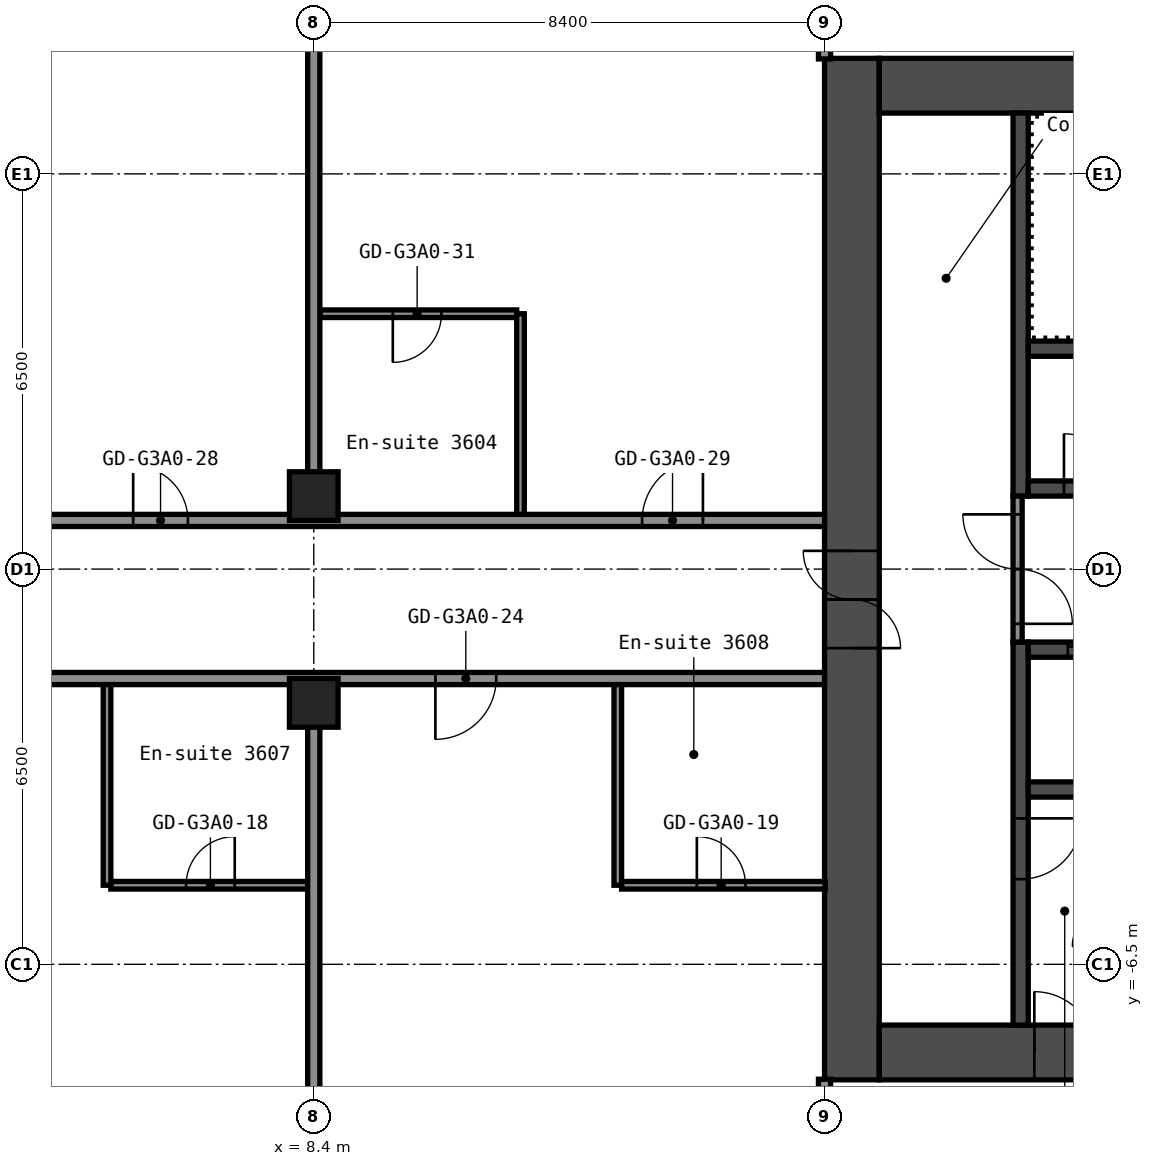
"""IFC4 building model, lengths in metres.
Left out: names, types, materials, properties, quantities, classifications, styles, units other than length and angle.
Written with IfcOpenShell. Run it as: python <this file> out.ifc"""

import sys

from ifc_helpers import new_model, si_unit, direction, frame, frame_2d, origin, origin_2d, place, context, subcontext, project, spatial, rectangle, hollow_rectangle, extrude, element, fill, save


model = new_model("IFC4")
c1 = context("Model", 3, precision=1e-05, world=origin(), true_north=direction((0.0, 1.0)))
c2 = subcontext(c1, "Body", "Model", "MODEL_VIEW")
j1 = project(units=[si_unit("LENGTHUNIT", "METRE"), si_unit("PLANEANGLEUNIT", "RADIAN")], contexts=[c1])
p1 = place(None, origin())
s1 = spatial("IfcSite", under=j1, at=p1, CompositionType="ELEMENT")
p2 = place(p1, origin())
s2 = spatial("IfcBuilding", under=s1, at=p2, CompositionType="ELEMENT")
p3 = place(p2, frame((0.0, 0.0, 131.0)))
s3 = spatial("IfcBuildingStorey", under=s2, at=p3, CompositionType="ELEMENT", Elevation=131.0)
for number, where, z_axis, x_axis in (
    (1, (8.4, -2.2, 0.0), (0.0, 0.0, 1.0), (1.0, 0.0, 0.0)),
    (2, (8.4, 1.2, 0.0), (0.0, 0.0, 1.0), (1.0, 0.0, 0.0)),
):
    element("IfcColumn", number, at=place(p3, frame(where, z_axis=z_axis, x_axis=x_axis)), inside=s3, PredefinedType="COLUMN", context=c2, shape_type="SweptSolid", body=[
        extrude(hollow_rectangle(XDim=0.8, YDim=0.8, WallThickness=0.032, at=origin_2d()), origin(), (0.0, 0.0, 1.0), 2.75),
    ])
p4 = place(p3, frame((17.25, -8.4, 0.0), z_axis=(0.0, 0.0, 1.0), x_axis=(0.0, 1.0, 0.0)))
e3 = element("IfcWall", 3, at=p4, inside=s3, PredefinedType="SHEAR", context=c2, shape_type="SweptSolid", body=[
    extrude(rectangle(XDim=16.8, YDim=0.9, at=frame_2d((8.4, 0.0))), origin(), (0.0, 0.0, 1.0), 2.75),
])
p5 = place(p4, frame((7.1, 0.0, 0.0)))
e4 = element("IfcOpeningElement", 4, at=p5, cuts=e3, PredefinedType="OPENING", context=c2, shape_type="SweptSolid", body=[
    extrude(rectangle(XDim=1.6, YDim=2.1, at=frame_2d((0.8, 1.05))), frame((0.0, 0.46, 0.0), z_axis=(0.0, -1.0, 0.0), x_axis=(1.0, 0.0, 0.0)), (0.0, 0.0, 1.0), 0.92),
])
p6 = place(p3, frame((17.7, 7.95, 0.0), z_axis=(0.0, 0.0, 1.0), x_axis=(1.0, 0.0, 0.0)))
e5 = element("IfcWall", 5, at=p6, inside=s3, PredefinedType="SHEAR", context=c2, shape_type="SweptSolid", body=[
    extrude(rectangle(XDim=15.0, YDim=0.9, at=frame_2d((7.5, 0.0))), origin(), (0.0, 0.0, 1.0), 2.75),
])
p7 = place(p6, frame((10.4, 0.0, 0.0)))
e6 = element("IfcOpeningElement", 6, at=p7, cuts=e5, PredefinedType="OPENING", context=c2, shape_type="SweptSolid", body=[
    extrude(rectangle(XDim=1.2, YDim=2.1, at=frame_2d((0.6, 1.05))), frame((0.0, 0.46, 0.0), z_axis=(0.0, -1.0, 0.0), x_axis=(1.0, 0.0, 0.0)), (0.0, 0.0, 1.0), 0.92),
])
p8 = place(p6, frame((13.35, 0.0, 0.0)))
e7 = element("IfcOpeningElement", 7, at=p8, cuts=e5, PredefinedType="OPENING", context=c2, shape_type="SweptSolid", body=[
    extrude(rectangle(XDim=0.9, YDim=2.1, at=frame_2d((0.45, 1.05))), frame((0.0, 0.46, 0.0), z_axis=(0.0, -1.0, 0.0), x_axis=(1.0, 0.0, 0.0)), (0.0, 0.0, 1.0), 0.92),
])
p9 = place(p3, frame((17.7, -7.95, 0.0), z_axis=(0.0, 0.0, 1.0), x_axis=(1.0, 0.0, 0.0)))
e8 = element("IfcWall", 8, at=p9, inside=s3, PredefinedType="SHEAR", context=c2, shape_type="SweptSolid", body=[
    extrude(rectangle(XDim=15.0, YDim=0.9, at=frame_2d((7.5, 0.0))), origin(), (0.0, 0.0, 1.0), 2.75),
])
p10 = place(p9, frame((2.55, 0.0, 0.0)))
e9 = element("IfcOpeningElement", 9, at=p10, cuts=e8, PredefinedType="OPENING", context=c2, shape_type="SweptSolid", body=[
    extrude(rectangle(XDim=1.0, YDim=2.1, at=frame_2d((0.5, 1.05))), frame((0.0, 0.46, 0.0), z_axis=(0.0, -1.0, 0.0), x_axis=(1.0, 0.0, 0.0)), (0.0, 0.0, 1.0), 0.92),
])
p11 = place(p3, frame((20.025, 1.2, 0.0), z_axis=(0.0, 0.0, 1.0), x_axis=(0.0, 1.0, 0.0)))
e10 = element("IfcWall", 10, at=p11, inside=s3, PredefinedType="SHEAR", context=c2, shape_type="SweptSolid", body=[
    extrude(rectangle(XDim=6.3, YDim=0.25, at=frame_2d((3.15, 0.0))), origin(), (0.0, 0.0, 1.0), 2.75),
])
p12 = place(p3, frame((20.025, -7.5, 0.0), z_axis=(0.0, 0.0, 1.0), x_axis=(0.0, 1.0, 0.0)))
e11 = element("IfcWall", 11, at=p12, inside=s3, PredefinedType="SHEAR", context=c2, shape_type="SweptSolid", body=[
    extrude(rectangle(XDim=6.3, YDim=0.25, at=frame_2d((3.15, 0.0))), origin(), (0.0, 0.0, 1.0), 2.75),
])
p13 = place(p12, frame((2.4, 0.0, 0.0)))
e12 = element("IfcOpeningElement", 12, at=p13, cuts=e11, PredefinedType="OPENING", context=c2, shape_type="SweptSolid", body=[
    extrude(rectangle(XDim=1.0, YDim=2.1, at=frame_2d((0.5, 1.05))), frame((0.0, 0.135, 0.0), z_axis=(0.0, -1.0, 0.0), x_axis=(1.0, 0.0, 0.0)), (0.0, 0.0, 1.0), 0.27),
])
p14 = place(p3, frame((20.15, 1.325, 0.0), z_axis=(0.0, 0.0, 1.0), x_axis=(1.0, 0.0, 0.0)))
e13 = element("IfcWall", 13, at=p14, inside=s3, PredefinedType="SHEAR", context=c2, shape_type="SweptSolid", body=[
    extrude(rectangle(XDim=7.5, YDim=0.25, at=frame_2d((3.75, 0.0))), origin(), (0.0, 0.0, 1.0), 2.75),
])
p15 = place(p14, frame((0.587, 0.0, 0.0)))
e14 = element("IfcOpeningElement", 14, at=p15, cuts=e13, PredefinedType="OPENING", context=c2, shape_type="SweptSolid", body=[
    extrude(rectangle(XDim=0.9, YDim=2.1, at=frame_2d((0.45, 1.05))), frame((0.0, 0.135, 0.0), z_axis=(0.0, -1.0, 0.0), x_axis=(1.0, 0.0, 0.0)), (0.0, 0.0, 1.0), 0.27),
])
p16 = place(p14, frame((4.288, 0.0, 0.0)))
e15 = element("IfcOpeningElement", 15, at=p16, cuts=e13, PredefinedType="OPENING", context=c2, shape_type="SweptSolid", body=[
    extrude(rectangle(XDim=0.9, YDim=2.1, at=frame_2d((0.45, 1.05))), frame((0.0, 0.135, 0.0), z_axis=(0.0, -1.0, 0.0), x_axis=(1.0, 0.0, 0.0)), (0.0, 0.0, 1.0), 0.27),
])
p17 = place(p3, frame((20.15, 3.625, 0.0), z_axis=(0.0, 0.0, 1.0), x_axis=(1.0, 0.0, 0.0)))
e16 = element("IfcWall", 16, at=p17, inside=s3, PredefinedType="SHEAR", context=c2, shape_type="SweptSolid", body=[
    extrude(rectangle(XDim=7.5, YDim=0.25, at=frame_2d((3.75, 0.0))), origin(), (0.0, 0.0, 1.0), 2.75),
])
p18 = place(p3, frame((20.15, -1.325, 0.0), z_axis=(0.0, 0.0, 1.0), x_axis=(1.0, 0.0, 0.0)))
e17 = element("IfcWall", 17, at=p18, inside=s3, PredefinedType="SHEAR", context=c2, shape_type="SweptSolid", body=[
    extrude(rectangle(XDim=7.5, YDim=0.25, at=frame_2d((3.75, 0.0))), origin(), (0.0, 0.0, 1.0), 2.75),
])
p19 = place(p18, frame((0.65, 0.0, 0.0)))
e18 = element("IfcOpeningElement", 18, at=p19, cuts=e17, PredefinedType="OPENING", context=c2, shape_type="SweptSolid", body=[
    extrude(rectangle(XDim=1.1, YDim=2.1, at=frame_2d((0.55, 1.05))), frame((0.0, 0.135, 0.0), z_axis=(0.0, -1.0, 0.0), x_axis=(1.0, 0.0, 0.0)), (0.0, 0.0, 1.0), 0.27),
])
p20 = place(p18, frame((3.05, 0.0, 0.0)))
e19 = element("IfcOpeningElement", 19, at=p20, cuts=e17, PredefinedType="OPENING", context=c2, shape_type="SweptSolid", body=[
    extrude(rectangle(XDim=1.1, YDim=2.1, at=frame_2d((0.55, 1.05))), frame((0.0, 0.135, 0.0), z_axis=(0.0, -1.0, 0.0), x_axis=(1.0, 0.0, 0.0)), (0.0, 0.0, 1.0), 0.27),
])
p21 = place(p18, frame((5.45, 0.0, 0.0)))
e20 = element("IfcOpeningElement", 20, at=p21, cuts=e17, PredefinedType="OPENING", context=c2, shape_type="SweptSolid", body=[
    extrude(rectangle(XDim=1.1, YDim=2.1, at=frame_2d((0.55, 1.05))), frame((0.0, 0.135, 0.0), z_axis=(0.0, -1.0, 0.0), x_axis=(1.0, 0.0, 0.0)), (0.0, 0.0, 1.0), 0.27),
])
p22 = place(p3, frame((20.15, -3.625, 0.0), z_axis=(0.0, 0.0, 1.0), x_axis=(1.0, 0.0, 0.0)))
e21 = element("IfcWall", 21, at=p22, inside=s3, PredefinedType="SHEAR", context=c2, shape_type="SweptSolid", body=[
    extrude(rectangle(XDim=7.5, YDim=0.25, at=frame_2d((3.75, 0.0))), origin(), (0.0, 0.0, 1.0), 2.75),
])
p23 = place(p3, frame((19.975, -1.2, 0.0), z_axis=(0.0, 0.0, 1.0), x_axis=(0.0, 1.0, 0.0)))
e22 = element("IfcWall", 22, at=p23, inside=s3, PredefinedType="PARTITIONING", context=c2, shape_type="SweptSolid", body=[
    extrude(rectangle(XDim=2.4, YDim=0.15, at=frame_2d((1.2, 0.0))), origin(), (0.0, 0.0, 1.0), 2.75),
])
p24 = place(p23, frame((0.3, 0.0, 0.0)))
e23 = element("IfcOpeningElement", 23, at=p24, cuts=e22, PredefinedType="OPENING", context=c2, shape_type="SweptSolid", body=[
    extrude(rectangle(XDim=1.8, YDim=2.1, at=frame_2d((0.9, 1.05))), frame((0.0, 0.085, 0.0), z_axis=(0.0, -1.0, 0.0), x_axis=(1.0, 0.0, 0.0)), (0.0, 0.0, 1.0), 0.17),
])
p25 = place(p3, frame((5.062, -5.2, 0.0), z_axis=(0.0, 0.0, 1.0), x_axis=(1.0, 0.0, 0.0)))
e24 = element("IfcWall", 24, at=p25, inside=s3, PredefinedType="PARTITIONING", context=c2, shape_type="SweptSolid", body=[
    extrude(rectangle(XDim=3.238, YDim=0.125, at=frame_2d((1.619, 0.0))), origin(), (0.0, 0.0, 1.0), 2.75),
])
p26 = place(p25, frame((1.238, 0.0, 0.0)))
e25 = element("IfcOpeningElement", 25, at=p26, cuts=e24, PredefinedType="OPENING", context=c2, shape_type="SweptSolid", body=[
    extrude(rectangle(XDim=0.8, YDim=2.1, at=frame_2d((0.4, 1.05))), frame((0.0, 0.073, 0.0), z_axis=(0.0, -1.0, 0.0), x_axis=(1.0, 0.0, 0.0)), (0.0, 0.0, 1.0), 0.145),
])
p27 = place(p3, frame((13.462, -5.2, 0.0), z_axis=(0.0, 0.0, 1.0), x_axis=(1.0, 0.0, 0.0)))
e26 = element("IfcWall", 26, at=p27, inside=s3, PredefinedType="PARTITIONING", context=c2, shape_type="SweptSolid", body=[
    extrude(rectangle(XDim=3.348, YDim=0.125, at=frame_2d((1.674, 0.0))), origin(), (0.0, 0.0, 1.0), 2.75),
])
p28 = place(p27, frame((1.238, 0.0, 0.0)))
e27 = element("IfcOpeningElement", 27, at=p28, cuts=e26, PredefinedType="OPENING", context=c2, shape_type="SweptSolid", body=[
    extrude(rectangle(XDim=0.8, YDim=2.1, at=frame_2d((0.4, 1.05))), frame((0.0, 0.073, 0.0), z_axis=(0.0, -1.0, 0.0), x_axis=(1.0, 0.0, 0.0)), (0.0, 0.0, 1.0), 0.145),
])
p29 = place(p3, frame((-16.8, -1.8, 0.0), z_axis=(0.0, 0.0, 1.0), x_axis=(1.0, 0.0, 0.0)))
e28 = element("IfcWall", 28, at=p29, inside=s3, PredefinedType="PARTITIONING", context=c2, shape_type="SweptSolid", body=[
    extrude(rectangle(XDim=33.6, YDim=0.2, at=frame_2d((16.8, 0.0))), origin(), (0.0, 0.0, 1.0), 2.75),
])
p30 = place(p29, frame((2.0, 0.0, 0.0)))
e29 = element("IfcOpeningElement", 29, at=p30, cuts=e28, PredefinedType="OPENING", context=c2, shape_type="SweptSolid", body=[
    extrude(rectangle(XDim=1.0, YDim=2.1, at=frame_2d((0.5, 1.05))), frame((0.0, 0.11, 0.0), z_axis=(0.0, -1.0, 0.0), x_axis=(1.0, 0.0, 0.0)), (0.0, 0.0, 1.0), 0.22),
])
p31 = place(p29, frame((10.47, 0.0, 0.0)))
e30 = element("IfcOpeningElement", 30, at=p31, cuts=e28, PredefinedType="OPENING", context=c2, shape_type="SweptSolid", body=[
    extrude(rectangle(XDim=0.9, YDim=2.1, at=frame_2d((0.45, 1.05))), frame((0.0, 0.11, 0.0), z_axis=(0.0, -1.0, 0.0), x_axis=(1.0, 0.0, 0.0)), (0.0, 0.0, 1.0), 0.22),
])
p32 = place(p29, frame((14.67, 0.0, 0.0)))
e31 = element("IfcOpeningElement", 31, at=p32, cuts=e28, PredefinedType="OPENING", context=c2, shape_type="SweptSolid", body=[
    extrude(rectangle(XDim=0.9, YDim=2.1, at=frame_2d((0.45, 1.05))), frame((0.0, 0.11, 0.0), z_axis=(0.0, -1.0, 0.0), x_axis=(1.0, 0.0, 0.0)), (0.0, 0.0, 1.0), 0.22),
])
p33 = place(p29, frame((18.8, 0.0, 0.0)))
e32 = element("IfcOpeningElement", 32, at=p33, cuts=e28, PredefinedType="OPENING", context=c2, shape_type="SweptSolid", body=[
    extrude(rectangle(XDim=1.0, YDim=2.1, at=frame_2d((0.5, 1.05))), frame((0.0, 0.11, 0.0), z_axis=(0.0, -1.0, 0.0), x_axis=(1.0, 0.0, 0.0)), (0.0, 0.0, 1.0), 0.22),
])
p34 = place(p29, frame((27.2, 0.0, 0.0)))
e33 = element("IfcOpeningElement", 33, at=p34, cuts=e28, PredefinedType="OPENING", context=c2, shape_type="SweptSolid", body=[
    extrude(rectangle(XDim=1.0, YDim=2.1, at=frame_2d((0.5, 1.05))), frame((0.0, 0.11, 0.0), z_axis=(0.0, -1.0, 0.0), x_axis=(1.0, 0.0, 0.0)), (0.0, 0.0, 1.0), 0.22),
])
p35 = place(p3, frame((-16.8, 0.8, 0.0), z_axis=(0.0, 0.0, 1.0), x_axis=(1.0, 0.0, 0.0)))
e34 = element("IfcWall", 34, at=p35, inside=s3, PredefinedType="PARTITIONING", context=c2, shape_type="SweptSolid", body=[
    extrude(rectangle(XDim=33.6, YDim=0.2, at=frame_2d((16.8, 0.0))), origin(), (0.0, 0.0, 1.0), 2.75),
])
p36 = place(p35, frame((2.0, 0.0, 0.0)))
e35 = element("IfcOpeningElement", 35, at=p36, cuts=e34, PredefinedType="OPENING", context=c2, shape_type="SweptSolid", body=[
    extrude(rectangle(XDim=1.0, YDim=2.1, at=frame_2d((0.5, 1.05))), frame((0.0, 0.11, 0.0), z_axis=(0.0, -1.0, 0.0), x_axis=(1.0, 0.0, 0.0)), (0.0, 0.0, 1.0), 0.22),
])
p37 = place(p35, frame((12.1, 0.0, 0.0)))
e36 = element("IfcOpeningElement", 36, at=p37, cuts=e34, PredefinedType="OPENING", context=c2, shape_type="SweptSolid", body=[
    extrude(rectangle(XDim=1.0, YDim=2.1, at=frame_2d((0.5, 1.05))), frame((0.0, 0.11, 0.0), z_axis=(0.0, -1.0, 0.0), x_axis=(1.0, 0.0, 0.0)), (0.0, 0.0, 1.0), 0.22),
])
p38 = place(p35, frame((18.03, 0.0, 0.0)))
e37 = element("IfcOpeningElement", 37, at=p38, cuts=e34, PredefinedType="OPENING", context=c2, shape_type="SweptSolid", body=[
    extrude(rectangle(XDim=0.9, YDim=2.1, at=frame_2d((0.45, 1.05))), frame((0.0, 0.11, 0.0), z_axis=(0.0, -1.0, 0.0), x_axis=(1.0, 0.0, 0.0)), (0.0, 0.0, 1.0), 0.22),
])
p39 = place(p35, frame((22.23, 0.0, 0.0)))
e38 = element("IfcOpeningElement", 38, at=p39, cuts=e34, PredefinedType="OPENING", context=c2, shape_type="SweptSolid", body=[
    extrude(rectangle(XDim=0.9, YDim=2.1, at=frame_2d((0.45, 1.05))), frame((0.0, 0.11, 0.0), z_axis=(0.0, -1.0, 0.0), x_axis=(1.0, 0.0, 0.0)), (0.0, 0.0, 1.0), 0.22),
])
p40 = place(p35, frame((30.6, 0.0, 0.0)))
e39 = element("IfcOpeningElement", 39, at=p40, cuts=e34, PredefinedType="OPENING", context=c2, shape_type="SweptSolid", body=[
    extrude(rectangle(XDim=1.0, YDim=2.1, at=frame_2d((0.5, 1.05))), frame((0.0, 0.11, 0.0), z_axis=(0.0, -1.0, 0.0), x_axis=(1.0, 0.0, 0.0)), (0.0, 0.0, 1.0), 0.22),
])
p41 = place(p3, frame((8.5, 4.2, 0.0), z_axis=(0.0, 0.0, 1.0), x_axis=(1.0, 0.0, 0.0)))
e40 = element("IfcWall", 40, at=p41, inside=s3, PredefinedType="PARTITIONING", context=c2, shape_type="SweptSolid", body=[
    extrude(rectangle(XDim=3.238, YDim=0.125, at=frame_2d((1.619, 0.0))), origin(), (0.0, 0.0, 1.0), 2.75),
])
p42 = place(p41, frame((1.2, 0.0, 0.0)))
e41 = element("IfcOpeningElement", 41, at=p42, cuts=e40, PredefinedType="OPENING", context=c2, shape_type="SweptSolid", body=[
    extrude(rectangle(XDim=0.8, YDim=2.1, at=frame_2d((0.4, 1.05))), frame((0.0, 0.073, 0.0), z_axis=(0.0, -1.0, 0.0), x_axis=(1.0, 0.0, 0.0)), (0.0, 0.0, 1.0), 0.145),
])
p43 = place(p3, frame((5.0, -5.2, 0.0), z_axis=(0.0, 0.0, 1.0), x_axis=(0.0, 1.0, 0.0)))
e42 = element("IfcWall", 42, at=p43, inside=s3, PredefinedType="PARTITIONING", context=c2, shape_type="SweptSolid", body=[
    extrude(rectangle(XDim=3.3, YDim=0.125, at=frame_2d((1.65, 0.0))), origin(), (0.0, 0.0, 1.0), 2.75),
])
for number, where, z_axis, x_axis in (
    (43, (8.4, -19.3, 0.0), (0.0, 0.0, 1.0), (0.0, 1.0, 0.0)),
    (44, (8.4, 1.59, 0.0), (0.0, 0.0, 1.0), (0.0, 1.0, 0.0)),
):
    element("IfcWall", number, at=place(p3, frame(where, z_axis=z_axis, x_axis=x_axis)), inside=s3, PredefinedType="PARTITIONING", context=c2, shape_type="SweptSolid", body=[
        extrude(rectangle(XDim=16.71, YDim=0.2, at=frame_2d((8.355, 0.0))), origin(), (0.0, 0.0, 1.0), 2.75),
    ])
for number, where, z_axis, x_axis in (
    (45, (11.8, 0.9, 0.0), (0.0, 0.0, 1.0), (0.0, 1.0, 0.0)),
    (46, (13.4, -5.2, 0.0), (0.0, 0.0, 1.0), (0.0, 1.0, 0.0)),
):
    element("IfcWall", number, at=place(p3, frame(where, z_axis=z_axis, x_axis=x_axis)), inside=s3, PredefinedType="PARTITIONING", context=c2, shape_type="SweptSolid", body=[
        extrude(rectangle(XDim=3.3, YDim=0.125, at=frame_2d((1.65, 0.0))), origin(), (0.0, 0.0, 1.0), 2.75),
    ])
p44 = place(p3, frame((16.8, -19.3, 0.0), z_axis=(0.0, 0.0, 1.0), x_axis=(0.0, 1.0, 0.0)))
e47 = element("IfcWall", 47, at=p44, inside=s3, PredefinedType="PARTITIONING", context=c2, shape_type="SweptSolid", body=[
    extrude(rectangle(XDim=10.91, YDim=0.2, at=frame_2d((5.455, 0.0))), origin(), (0.0, 0.0, 1.0), 2.75),
])
p45 = place(p3, frame((16.8, 8.39, 0.0), z_axis=(0.0, 0.0, 1.0), x_axis=(0.0, 1.0, 0.0)))
e48 = element("IfcWall", 48, at=p45, inside=s3, PredefinedType="PARTITIONING", context=c2, shape_type="SweptSolid", body=[
    extrude(rectangle(XDim=9.91, YDim=0.2, at=frame_2d((4.955, 0.0))), origin(), (0.0, 0.0, 1.0), 2.75),
])
p46 = place(p5, origin())
e49 = element("IfcDoor", 49, at=p46, inside=s3, OperationType="DOUBLE_DOOR_SINGLE_SWING", PredefinedType="DOOR", context=c2, shape_type="SweptSolid", body=[
    extrude(rectangle(XDim=1.6, YDim=2.1, at=frame_2d((0.8, 1.05))), frame((0.0, 0.025, 0.0), z_axis=(0.0, -1.0, 0.0), x_axis=(1.0, 0.0, 0.0)), (0.0, 0.0, 1.0), 0.05),
])
fill(e4, e49)
p47 = place(p10, origin())
e50 = element("IfcDoor", 50, at=p47, inside=s3, OperationType="SINGLE_SWING_RIGHT", PredefinedType="DOOR", context=c2, shape_type="SweptSolid", body=[
    extrude(rectangle(XDim=1.0, YDim=2.1, at=frame_2d((0.5, 1.05))), frame((0.0, 0.025, 0.0), z_axis=(0.0, -1.0, 0.0), x_axis=(1.0, 0.0, 0.0)), (0.0, 0.0, 1.0), 0.05),
])
fill(e9, e50)
p48 = place(p13, origin())
e51 = element("IfcDoor", 51, at=p48, inside=s3, OperationType="SINGLE_SWING_RIGHT", PredefinedType="DOOR", context=c2, shape_type="SweptSolid", body=[
    extrude(rectangle(XDim=1.0, YDim=2.1, at=frame_2d((0.5, 1.05))), frame((0.0, 0.025, 0.0), z_axis=(0.0, -1.0, 0.0), x_axis=(1.0, 0.0, 0.0)), (0.0, 0.0, 1.0), 0.05),
])
fill(e12, e51)
p49 = place(p24, origin())
e52 = element("IfcDoor", 52, at=p49, inside=s3, OperationType="DOUBLE_DOOR_SINGLE_SWING", PredefinedType="DOOR", context=c2, shape_type="SweptSolid", body=[
    extrude(rectangle(XDim=1.8, YDim=2.1, at=frame_2d((0.9, 1.05))), frame((0.0, 0.025, 0.0), z_axis=(0.0, -1.0, 0.0), x_axis=(1.0, 0.0, 0.0)), (0.0, 0.0, 1.0), 0.05),
])
fill(e23, e52)
p50 = place(p15, origin())
e53 = element("IfcDoor", 53, at=p50, inside=s3, OperationType="SINGLE_SWING_RIGHT", PredefinedType="DOOR", context=c2, shape_type="SweptSolid", body=[
    extrude(rectangle(XDim=0.9, YDim=2.1, at=frame_2d((0.45, 1.05))), frame((0.0, 0.025, 0.0), z_axis=(0.0, -1.0, 0.0), x_axis=(1.0, 0.0, 0.0)), (0.0, 0.0, 1.0), 0.05),
])
fill(e14, e53)
p51 = place(p19, origin())
e54 = element("IfcDoor", 54, at=p51, inside=s3, OperationType="DOUBLE_DOOR_SLIDING", PredefinedType="DOOR", context=c2, shape_type="SweptSolid", body=[
    extrude(rectangle(XDim=1.1, YDim=2.1, at=frame_2d((0.55, 1.05))), frame((0.0, 0.025, 0.0), z_axis=(0.0, -1.0, 0.0), x_axis=(1.0, 0.0, 0.0)), (0.0, 0.0, 1.0), 0.05),
])
fill(e18, e54)
p52 = place(p26, origin())
e55 = element("IfcDoor", 55, at=p52, inside=s3, OperationType="SINGLE_SWING_LEFT", PredefinedType="DOOR", context=c2, shape_type="SweptSolid", body=[
    extrude(rectangle(XDim=0.8, YDim=2.1, at=frame_2d((0.4, 1.05))), frame((0.0, 0.025, 0.0), z_axis=(0.0, -1.0, 0.0), x_axis=(1.0, 0.0, 0.0)), (0.0, 0.0, 1.0), 0.05),
])
fill(e25, e55)
p53 = place(p28, origin())
e56 = element("IfcDoor", 56, at=p53, inside=s3, OperationType="SINGLE_SWING_RIGHT", PredefinedType="DOOR", context=c2, shape_type="SweptSolid", body=[
    extrude(rectangle(XDim=0.8, YDim=2.1, at=frame_2d((0.4, 1.05))), frame((0.0, 0.025, 0.0), z_axis=(0.0, -1.0, 0.0), x_axis=(1.0, 0.0, 0.0)), (0.0, 0.0, 1.0), 0.05),
])
fill(e27, e56)
p54 = place(p34, origin())
e57 = element("IfcDoor", 57, at=p54, inside=s3, OperationType="SINGLE_SWING_LEFT", PredefinedType="DOOR", context=c2, shape_type="SweptSolid", body=[
    extrude(rectangle(XDim=1.0, YDim=2.1, at=frame_2d((0.5, 1.05))), frame((0.0, 0.025, 0.0), z_axis=(0.0, -1.0, 0.0), x_axis=(1.0, 0.0, 0.0)), (0.0, 0.0, 1.0), 0.05),
])
fill(e33, e57)
p55 = place(p39, origin())
e58 = element("IfcDoor", 58, at=p55, inside=s3, OperationType="SINGLE_SWING_RIGHT", PredefinedType="DOOR", context=c2, shape_type="SweptSolid", body=[
    extrude(rectangle(XDim=0.9, YDim=2.1, at=frame_2d((0.45, 1.05))), frame((0.0, 0.025, 0.0), z_axis=(0.0, -1.0, 0.0), x_axis=(1.0, 0.0, 0.0)), (0.0, 0.0, 1.0), 0.05),
])
fill(e38, e58)
p56 = place(p40, origin())
e59 = element("IfcDoor", 59, at=p56, inside=s3, OperationType="SINGLE_SWING_LEFT", PredefinedType="DOOR", context=c2, shape_type="SweptSolid", body=[
    extrude(rectangle(XDim=1.0, YDim=2.1, at=frame_2d((0.5, 1.05))), frame((0.0, 0.025, 0.0), z_axis=(0.0, -1.0, 0.0), x_axis=(1.0, 0.0, 0.0)), (0.0, 0.0, 1.0), 0.05),
])
fill(e39, e59)
p57 = place(p42, origin())
e60 = element("IfcDoor", 60, at=p57, inside=s3, OperationType="SINGLE_SWING_LEFT", PredefinedType="DOOR", context=c2, shape_type="SweptSolid", body=[
    extrude(rectangle(XDim=0.8, YDim=2.1, at=frame_2d((0.4, 1.05))), frame((0.0, 0.025, 0.0), z_axis=(0.0, -1.0, 0.0), x_axis=(1.0, 0.0, 0.0)), (0.0, 0.0, 1.0), 0.05),
])
fill(e41, e60)
save(model, sys.argv[1])
